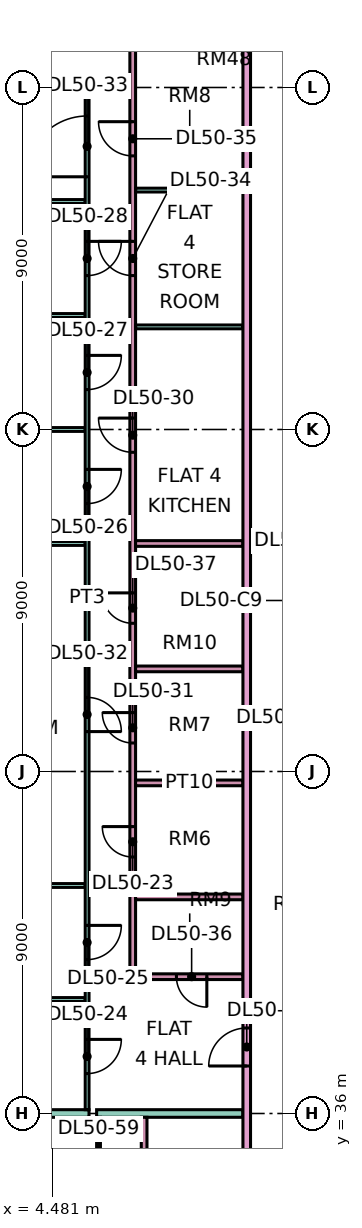
"""IFC4 building model, lengths in metres.
Left out: names, types, materials, properties, quantities, classifications, styles, units other than length and angle.
Written with IfcOpenShell. Run it as: python <this file> out.ifc"""

import sys

from ifc_helpers import new_model, si_unit, direction, frame, frame_2d, origin, place, context, subcontext, project, spatial, rectangle, extrude, element, fill, save


model = new_model("IFC4")
c1 = context("Model", 3, precision=1e-05, world=origin(), true_north=direction((0.0, 1.0)))
c2 = subcontext(c1, "Body", "Model", "MODEL_VIEW")
j1 = project(units=[si_unit("LENGTHUNIT", "METRE"), si_unit("PLANEANGLEUNIT", "RADIAN")], contexts=[c1])
p1 = place(None, origin())
s1 = spatial("IfcSite", under=j1, at=p1, CompositionType="ELEMENT")
p2 = place(p1, origin())
s2 = spatial("IfcBuilding", under=s1, at=p2, CompositionType="ELEMENT")
p3 = place(p2, frame((0.0, 0.0, 215.4)))
s3 = spatial("IfcBuildingStorey", under=s2, at=p3, CompositionType="ELEMENT", Elevation=215.4)
for number, where, z_axis, x_axis in (
    (1, (-1.351, 54.0, 0.0), (0.0, 0.0, 1.0), (1.0, 0.0, 0.0)),
    (2, (-1.351, 57.0, 0.0), (0.0, 0.0, 1.0), (1.0, 0.0, 0.0)),
    (3, (-1.351, 60.0, 0.0), (0.0, 0.0, 1.0), (1.0, 0.0, 0.0)),
):
    element("IfcWall", number, at=place(p3, frame(where, z_axis=z_axis, x_axis=x_axis)), inside=s3, PredefinedType="PARTITIONING", context=c2, shape_type="SweptSolid", body=[
        extrude(rectangle(XDim=6.701, YDim=0.1, at=frame_2d((3.351, 0.0))), origin(), (0.0, 0.0, 1.0), 3.35),
    ])
p4 = place(p3, frame((0.0, 36.0, 0.0), z_axis=(0.0, 0.0, 1.0), x_axis=(1.0, 0.0, 0.0)))
e4 = element("IfcWall", 4, at=p4, inside=s3, PredefinedType="PARTITIONING", context=c2, shape_type="SweptSolid", body=[
    extrude(rectangle(XDim=5.45, YDim=0.2, at=frame_2d((2.725, 0.0))), origin(), (0.0, 0.0, 1.0), 3.35),
])
p5 = place(p3, frame((-1.35, 51.0, 0.0), z_axis=(0.0, 0.0, 1.0), x_axis=(1.0, 0.0, 0.0)))
e5 = element("IfcWall", 5, at=p5, inside=s3, PredefinedType="PARTITIONING", context=c2, shape_type="SweptSolid", body=[
    extrude(rectangle(XDim=6.7, YDim=0.1, at=frame_2d((3.35, 0.0))), origin(), (0.0, 0.0, 1.0), 3.35),
])
for number, where, z_axis, x_axis in (
    (6, (0.074, 39.0, 0.0), (0.0, 0.0, 1.0), (1.0, 0.0, 0.0)),
    (7, (0.074, 42.0, 0.0), (0.0, 0.0, 1.0), (1.0, 0.0, 0.0)),
):
    element("IfcWall", number, at=place(p3, frame(where, z_axis=z_axis, x_axis=x_axis)), inside=s3, PredefinedType="PARTITIONING", context=c2, shape_type="SweptSolid", body=[
        extrude(rectangle(XDim=5.276, YDim=0.1, at=frame_2d((2.638, 0.0))), origin(), (0.0, 0.0, 1.0), 3.35),
    ])
p6 = place(p3, frame((5.4, 36.1, 0.0), z_axis=(0.0, 0.0, 1.0), x_axis=(0.0, 1.0, 0.0)))
e8 = element("IfcWall", 8, at=p6, inside=s3, PredefinedType="PARTITIONING", context=c2, shape_type="SweptSolid", body=[
    extrude(rectangle(XDim=26.95, YDim=0.1, at=frame_2d((13.475, 0.0))), origin(), (0.0, 0.0, 1.0), 3.35),
])
p7 = place(p6, frame((0.95, 0.0, 0.0)))
e9 = element("IfcOpeningElement", 9, at=p7, cuts=e8, PredefinedType="OPENING", context=c2, shape_type="SweptSolid", body=[
    extrude(rectangle(XDim=0.9, YDim=2.1, at=frame_2d((0.45, 1.05))), frame((0.0, 0.06, 0.0), z_axis=(0.0, -1.0, 0.0), x_axis=(1.0, 0.0, 0.0)), (0.0, 0.0, 1.0), 0.12),
])
p8 = place(p6, frame((3.95, 0.0, 0.0)))
e10 = element("IfcOpeningElement", 10, at=p8, cuts=e8, PredefinedType="OPENING", context=c2, shape_type="SweptSolid", body=[
    extrude(rectangle(XDim=0.9, YDim=2.1, at=frame_2d((0.45, 1.05))), frame((0.0, 0.06, 0.0), z_axis=(0.0, -1.0, 0.0), x_axis=(1.0, 0.0, 0.0)), (0.0, 0.0, 1.0), 0.12),
])
p9 = place(p6, frame((15.95, 0.0, 0.0)))
e11 = element("IfcOpeningElement", 11, at=p9, cuts=e8, PredefinedType="OPENING", context=c2, shape_type="SweptSolid", body=[
    extrude(rectangle(XDim=0.9, YDim=2.1, at=frame_2d((0.45, 1.05))), frame((0.0, 0.06, 0.0), z_axis=(0.0, -1.0, 0.0), x_axis=(1.0, 0.0, 0.0)), (0.0, 0.0, 1.0), 0.12),
])
p10 = place(p6, frame((18.95, 0.0, 0.0)))
e12 = element("IfcOpeningElement", 12, at=p10, cuts=e8, PredefinedType="OPENING", context=c2, shape_type="SweptSolid", body=[
    extrude(rectangle(XDim=0.9, YDim=2.1, at=frame_2d((0.45, 1.05))), frame((0.0, 0.06, 0.0), z_axis=(0.0, -1.0, 0.0), x_axis=(1.0, 0.0, 0.0)), (0.0, 0.0, 1.0), 0.12),
])
p11 = place(p6, frame((21.95, 0.0, 0.0)))
e13 = element("IfcOpeningElement", 13, at=p11, cuts=e8, PredefinedType="OPENING", context=c2, shape_type="SweptSolid", body=[
    extrude(rectangle(XDim=0.9, YDim=2.1, at=frame_2d((0.45, 1.05))), frame((0.0, 0.06, 0.0), z_axis=(0.0, -1.0, 0.0), x_axis=(1.0, 0.0, 0.0)), (0.0, 0.0, 1.0), 0.12),
])
p12 = place(p6, frame((9.95, 0.0, 0.0)))
e14 = element("IfcOpeningElement", 14, at=p12, cuts=e8, PredefinedType="OPENING", context=c2, shape_type="SweptSolid", body=[
    extrude(rectangle(XDim=0.9, YDim=2.1, at=frame_2d((0.45, 1.05))), frame((0.0, 0.06, 0.0), z_axis=(0.0, -1.0, 0.0), x_axis=(1.0, 0.0, 0.0)), (0.0, 0.0, 1.0), 0.12),
])
p13 = place(p6, frame((24.55, 0.0, 0.0)))
e15 = element("IfcOpeningElement", 15, at=p13, cuts=e8, PredefinedType="OPENING", context=c2, shape_type="SweptSolid", body=[
    extrude(rectangle(XDim=1.6, YDim=2.1, at=frame_2d((0.8, 1.05))), frame((0.0, 0.06, 0.0), z_axis=(0.0, -1.0, 0.0), x_axis=(1.0, 0.0, 0.0)), (0.0, 0.0, 1.0), 0.12),
])
p14 = place(p3, frame((5.45, 63.0, 0.0), z_axis=(0.0, 0.0, 1.0), x_axis=(1.0, 0.0, 0.0)))
e16 = element("IfcWall", 16, at=p14, inside=s3, PredefinedType="PARTITIONING", context=c2, shape_type="SweptSolid", body=[
    extrude(rectangle(XDim=0.55, YDim=0.1, at=frame_2d((0.275, 0.0))), origin(), (0.0, 0.0, 1.0), 3.35),
])
p15 = place(p3, frame((5.65, 36.0, 0.0), z_axis=(0.0, 0.0, 1.0), x_axis=(1.0, 0.0, 0.0)))
e17 = element("IfcWall", 17, at=p15, inside=s3, PredefinedType="PARTITIONING", context=c2, shape_type="SweptSolid", body=[
    extrude(rectangle(XDim=3.85, YDim=0.2, at=frame_2d((1.925, 0.0))), origin(), (0.0, 0.0, 1.0), 3.35),
])
p16 = place(p3, frame((5.7, 29.95, 0.0), z_axis=(0.0, 0.0, 1.0), x_axis=(0.0, 1.0, 0.0)))
e18 = element("IfcWall", 18, at=p16, inside=s3, PredefinedType="PARTITIONING", context=c2, shape_type="SweptSolid", body=[
    extrude(rectangle(XDim=5.95, YDim=0.1, at=frame_2d((2.975, 0.0))), origin(), (0.0, 0.0, 1.0), 3.35),
])
p17 = place(p16, frame((1.1, 0.0, 0.0)))
e19 = element("IfcOpeningElement", 19, at=p17, cuts=e18, PredefinedType="OPENING", context=c2, shape_type="SweptSolid", body=[
    extrude(rectangle(XDim=0.9, YDim=2.1, at=frame_2d((0.45, 1.05))), frame((0.0, 0.06, 0.0), z_axis=(0.0, -1.0, 0.0), x_axis=(1.0, 0.0, 0.0)), (0.0, 0.0, 1.0), 0.12),
])
p18 = place(p16, frame((4.1, 0.0, 0.0)))
e20 = element("IfcOpeningElement", 20, at=p18, cuts=e18, PredefinedType="OPENING", context=c2, shape_type="SweptSolid", body=[
    extrude(rectangle(XDim=0.9, YDim=2.1, at=frame_2d((0.45, 1.05))), frame((0.0, 0.06, 0.0), z_axis=(0.0, -1.0, 0.0), x_axis=(1.0, 0.0, 0.0)), (0.0, 0.0, 1.0), 0.12),
])
p19 = place(p3, frame((6.6, 39.525, 0.0), z_axis=(0.0, 0.0, 1.0), x_axis=(0.0, 1.0, 0.0)))
e21 = element("IfcWall", 21, at=p19, inside=s3, PredefinedType="PARTITIONING", context=c2, shape_type="SweptSolid", body=[
    extrude(rectangle(XDim=24.825, YDim=0.15, at=frame_2d((12.413, 0.0))), origin(), (0.0, 0.0, 1.0), 3.35),
])
p20 = place(p19, frame((3.225, 0.0, 0.0)))
e22 = element("IfcOpeningElement", 22, at=p20, cuts=e21, PredefinedType="OPENING", context=c2, shape_type="SweptSolid", body=[
    extrude(rectangle(XDim=0.8, YDim=2.1, at=frame_2d((0.4, 1.05))), frame((0.0, 0.085, 0.0), z_axis=(0.0, -1.0, 0.0), x_axis=(1.0, 0.0, 0.0)), (0.0, 0.0, 1.0), 0.17),
])
p21 = place(p19, frame((13.875, 0.0, 0.0)))
e23 = element("IfcOpeningElement", 23, at=p21, cuts=e21, PredefinedType="OPENING", context=c2, shape_type="SweptSolid", body=[
    extrude(rectangle(XDim=0.9, YDim=2.1, at=frame_2d((0.45, 1.05))), frame((0.0, 0.085, 0.0), z_axis=(0.0, -1.0, 0.0), x_axis=(1.0, 0.0, 0.0)), (0.0, 0.0, 1.0), 0.17),
])
p22 = place(p19, frame((6.225, 0.0, 0.0)))
e24 = element("IfcOpeningElement", 24, at=p22, cuts=e21, PredefinedType="OPENING", context=c2, shape_type="SweptSolid", body=[
    extrude(rectangle(XDim=0.8, YDim=2.1, at=frame_2d((0.4, 1.05))), frame((0.0, 0.085, 0.0), z_axis=(0.0, -1.0, 0.0), x_axis=(1.0, 0.0, 0.0)), (0.0, 0.0, 1.0), 0.17),
])
p23 = place(p19, frame((18.525, 0.0, 0.0)))
e25 = element("IfcOpeningElement", 25, at=p23, cuts=e21, PredefinedType="OPENING", context=c2, shape_type="SweptSolid", body=[
    extrude(rectangle(XDim=0.9, YDim=2.1, at=frame_2d((0.45, 1.05))), frame((0.0, 0.085, 0.0), z_axis=(0.0, -1.0, 0.0), x_axis=(1.0, 0.0, 0.0)), (0.0, 0.0, 1.0), 0.17),
])
p24 = place(p19, frame((21.675, 0.0, 0.0)))
e26 = element("IfcOpeningElement", 26, at=p24, cuts=e21, PredefinedType="OPENING", context=c2, shape_type="SweptSolid", body=[
    extrude(rectangle(XDim=0.9, YDim=2.1, at=frame_2d((0.45, 1.05))), frame((0.0, 0.085, 0.0), z_axis=(0.0, -1.0, 0.0), x_axis=(1.0, 0.0, 0.0)), (0.0, 0.0, 1.0), 0.17),
])
p25 = place(p19, frame((9.375, 0.0, 0.0)))
e27 = element("IfcOpeningElement", 27, at=p25, cuts=e21, PredefinedType="OPENING", context=c2, shape_type="SweptSolid", body=[
    extrude(rectangle(XDim=0.8, YDim=2.1, at=frame_2d((0.4, 1.05))), frame((0.0, 0.085, 0.0), z_axis=(0.0, -1.0, 0.0), x_axis=(1.0, 0.0, 0.0)), (0.0, 0.0, 1.0), 0.17),
])
p26 = place(p3, frame((6.675, 39.6, 0.0), z_axis=(0.0, 0.0, 1.0), x_axis=(1.0, 0.0, 0.0)))
e28 = element("IfcWall", 28, at=p26, inside=s3, PredefinedType="PARTITIONING", context=c2, shape_type="SweptSolid", body=[
    extrude(rectangle(XDim=2.825, YDim=0.15, at=frame_2d((1.413, 0.0))), origin(), (0.0, 0.0, 1.0), 3.35),
])
p27 = place(p26, frame((1.075, 0.0, 0.0)))
e29 = element("IfcOpeningElement", 29, at=p27, cuts=e28, PredefinedType="OPENING", context=c2, shape_type="SweptSolid", body=[
    extrude(rectangle(XDim=0.8, YDim=2.1, at=frame_2d((0.4, 1.05))), frame((0.0, 0.085, 0.0), z_axis=(0.0, -1.0, 0.0), x_axis=(1.0, 0.0, 0.0)), (0.0, 0.0, 1.0), 0.17),
])
for number, where, z_axis, x_axis in (
    (30, (6.675, 41.7, 0.0), (0.0, 0.0, 1.0), (1.0, 0.0, 0.0)),
    (31, (6.675, 44.7, 0.0), (0.0, 0.0, 1.0), (1.0, 0.0, 0.0)),
    (32, (6.675, 47.7, 0.0), (0.0, 0.0, 1.0), (1.0, 0.0, 0.0)),
    (33, (6.675, 51.0, 0.0), (0.0, 0.0, 1.0), (1.0, 0.0, 0.0)),
):
    element("IfcWall", number, at=place(p3, frame(where, z_axis=z_axis, x_axis=x_axis)), inside=s3, PredefinedType="PARTITIONING", context=c2, shape_type="SweptSolid", body=[
        extrude(rectangle(XDim=2.825, YDim=0.15, at=frame_2d((1.413, 0.0))), origin(), (0.0, 0.0, 1.0), 3.35),
    ])
for number, where, z_axis, x_axis in (
    (34, (6.675, 56.7, 0.0), (0.0, 0.0, 1.0), (1.0, 0.0, 0.0)),
    (35, (6.675, 60.3, 0.0), (0.0, 0.0, 1.0), (1.0, 0.0, 0.0)),
):
    element("IfcWall", number, at=place(p3, frame(where, z_axis=z_axis, x_axis=x_axis)), inside=s3, PredefinedType="PARTITIONING", context=c2, shape_type="SweptSolid", body=[
        extrude(rectangle(XDim=2.825, YDim=0.1, at=frame_2d((1.413, 0.0))), origin(), (0.0, 0.0, 1.0), 3.35),
    ])
p28 = place(p3, frame((6.9, 27.225, 0.0), z_axis=(0.0, 0.0, 1.0), x_axis=(0.0, 1.0, 0.0)))
e36 = element("IfcWall", 36, at=p28, inside=s3, PredefinedType="PARTITIONING", context=c2, shape_type="SweptSolid", body=[
    extrude(rectangle(XDim=8.675, YDim=0.15, at=frame_2d((4.337, 0.0))), origin(), (0.0, 0.0, 1.0), 3.35),
])
p29 = place(p28, frame((1.125, 0.0, 0.0)))
e37 = element("IfcOpeningElement", 37, at=p29, cuts=e36, PredefinedType="OPENING", context=c2, shape_type="SweptSolid", body=[
    extrude(rectangle(XDim=0.8, YDim=2.1, at=frame_2d((0.4, 1.05))), frame((0.0, 0.085, 0.0), z_axis=(0.0, -1.0, 0.0), x_axis=(1.0, 0.0, 0.0)), (0.0, 0.0, 1.0), 0.17),
])
p30 = place(p28, frame((5.475, 0.0, 0.0)))
e38 = element("IfcOpeningElement", 38, at=p30, cuts=e36, PredefinedType="OPENING", context=c2, shape_type="SweptSolid", body=[
    extrude(rectangle(XDim=0.9, YDim=2.1, at=frame_2d((0.45, 1.05))), frame((0.0, 0.085, 0.0), z_axis=(0.0, -1.0, 0.0), x_axis=(1.0, 0.0, 0.0)), (0.0, 0.0, 1.0), 0.17),
])
p31 = place(p3, frame((9.6, 20.0, 0.0), z_axis=(0.0, 0.0, 1.0), x_axis=(0.0, 1.0, 0.0)))
e39 = element("IfcWall", 39, at=p31, inside=s3, PredefinedType="PARTITIONING", context=c2, shape_type="SweptSolid", body=[
    extrude(rectangle(XDim=44.35, YDim=0.2, at=frame_2d((22.175, 0.0))), origin(), (0.0, 0.0, 1.0), 3.35),
])
p32 = place(p31, frame((17.25, 0.0, 0.0)))
e40 = element("IfcOpeningElement", 40, at=p32, cuts=e39, PredefinedType="OPENING", context=c2, shape_type="SweptSolid", body=[
    extrude(rectangle(XDim=1.0, YDim=2.1, at=frame_2d((0.5, 1.05))), frame((0.0, 0.11, 0.0), z_axis=(0.0, -1.0, 0.0), x_axis=(1.0, 0.0, 0.0)), (0.0, 0.0, 1.0), 0.22),
])
p33 = place(p31, frame((0.6, 0.0, 0.0)))
e41 = element("IfcOpeningElement", 41, at=p33, cuts=e39, PredefinedType="OPENING", context=c2, shape_type="SweptSolid", body=[
    extrude(rectangle(XDim=1.2, YDim=2.1, at=frame_2d((0.6, 1.05))), frame((0.0, 0.11, 0.0), z_axis=(0.0, -1.0, 0.0), x_axis=(1.0, 0.0, 0.0)), (0.0, 0.0, 1.0), 0.22),
])
p34 = place(p31, frame((4.35, 0.0, 0.0)))
e42 = element("IfcOpeningElement", 42, at=p34, cuts=e39, PredefinedType="OPENING", context=c2, shape_type="SweptSolid", body=[
    extrude(rectangle(XDim=1.0, YDim=2.1, at=frame_2d((0.5, 1.05))), frame((0.0, 0.11, 0.0), z_axis=(0.0, -1.0, 0.0), x_axis=(1.0, 0.0, 0.0)), (0.0, 0.0, 1.0), 0.22),
])
p35 = place(p20, frame((0.8, 0.0, 0.0), z_axis=(0.0, 0.0, 1.0), x_axis=(-1.0, 0.0, 0.0)))
e43 = element("IfcDoor", 43, at=p35, inside=s3, OperationType="SINGLE_SWING_RIGHT", PredefinedType="DOOR", context=c2, shape_type="SweptSolid", body=[
    extrude(rectangle(XDim=0.8, YDim=2.1, at=frame_2d((0.4, 1.05))), frame((0.0, 0.025, 0.0), z_axis=(0.0, -1.0, 0.0), x_axis=(1.0, 0.0, 0.0)), (0.0, 0.0, 1.0), 0.05),
])
fill(e22, e43)
p36 = place(p7, origin())
e44 = element("IfcDoor", 44, at=p36, inside=s3, OperationType="SINGLE_SWING_RIGHT", PredefinedType="DOOR", context=c2, shape_type="SweptSolid", body=[
    extrude(rectangle(XDim=0.9, YDim=2.1, at=frame_2d((0.45, 1.05))), frame((0.0, 0.025, 0.0), z_axis=(0.0, -1.0, 0.0), x_axis=(1.0, 0.0, 0.0)), (0.0, 0.0, 1.0), 0.05),
])
fill(e9, e44)
p37 = place(p8, origin())
e45 = element("IfcDoor", 45, at=p37, inside=s3, OperationType="SINGLE_SWING_RIGHT", PredefinedType="DOOR", context=c2, shape_type="SweptSolid", body=[
    extrude(rectangle(XDim=0.9, YDim=2.1, at=frame_2d((0.45, 1.05))), frame((0.0, 0.025, 0.0), z_axis=(0.0, -1.0, 0.0), x_axis=(1.0, 0.0, 0.0)), (0.0, 0.0, 1.0), 0.05),
])
fill(e10, e45)
p38 = place(p9, origin())
e46 = element("IfcDoor", 46, at=p38, inside=s3, OperationType="SINGLE_SWING_RIGHT", PredefinedType="DOOR", context=c2, shape_type="SweptSolid", body=[
    extrude(rectangle(XDim=0.9, YDim=2.1, at=frame_2d((0.45, 1.05))), frame((0.0, 0.025, 0.0), z_axis=(0.0, -1.0, 0.0), x_axis=(1.0, 0.0, 0.0)), (0.0, 0.0, 1.0), 0.05),
])
fill(e11, e46)
p39 = place(p10, origin())
e47 = element("IfcDoor", 47, at=p39, inside=s3, OperationType="SINGLE_SWING_RIGHT", PredefinedType="DOOR", context=c2, shape_type="SweptSolid", body=[
    extrude(rectangle(XDim=0.9, YDim=2.1, at=frame_2d((0.45, 1.05))), frame((0.0, 0.025, 0.0), z_axis=(0.0, -1.0, 0.0), x_axis=(1.0, 0.0, 0.0)), (0.0, 0.0, 1.0), 0.05),
])
fill(e12, e47)
p40 = place(p11, origin())
e48 = element("IfcDoor", 48, at=p40, inside=s3, OperationType="SINGLE_SWING_RIGHT", PredefinedType="DOOR", context=c2, shape_type="SweptSolid", body=[
    extrude(rectangle(XDim=0.9, YDim=2.1, at=frame_2d((0.45, 1.05))), frame((0.0, 0.025, 0.0), z_axis=(0.0, -1.0, 0.0), x_axis=(1.0, 0.0, 0.0)), (0.0, 0.0, 1.0), 0.05),
])
fill(e13, e48)
p41 = place(p32, origin())
e49 = element("IfcDoor", 49, at=p41, inside=s3, OperationType="SINGLE_SWING_LEFT", PredefinedType="DOOR", context=c2, shape_type="SweptSolid", body=[
    extrude(rectangle(XDim=1.0, YDim=2.1, at=frame_2d((0.5, 1.05))), frame((0.0, 0.025, 0.0), z_axis=(0.0, -1.0, 0.0), x_axis=(1.0, 0.0, 0.0)), (0.0, 0.0, 1.0), 0.05),
])
fill(e40, e49)
p42 = place(p21, frame((0.9, 0.0, 0.0), z_axis=(0.0, 0.0, 1.0), x_axis=(-1.0, 0.0, 0.0)))
e50 = element("IfcDoor", 50, at=p42, inside=s3, OperationType="SINGLE_SWING_RIGHT", PredefinedType="DOOR", context=c2, shape_type="SweptSolid", body=[
    extrude(rectangle(XDim=0.9, YDim=2.1, at=frame_2d((0.45, 1.05))), frame((0.0, 0.025, 0.0), z_axis=(0.0, -1.0, 0.0), x_axis=(1.0, 0.0, 0.0)), (0.0, 0.0, 1.0), 0.05),
])
fill(e23, e50)
p43 = place(p22, frame((0.8, 0.0, 0.0), z_axis=(0.0, 0.0, 1.0), x_axis=(-1.0, 0.0, 0.0)))
e51 = element("IfcDoor", 51, at=p43, inside=s3, OperationType="SINGLE_SWING_RIGHT", PredefinedType="DOOR", context=c2, shape_type="SweptSolid", body=[
    extrude(rectangle(XDim=0.8, YDim=2.1, at=frame_2d((0.4, 1.05))), frame((0.0, 0.025, 0.0), z_axis=(0.0, -1.0, 0.0), x_axis=(1.0, 0.0, 0.0)), (0.0, 0.0, 1.0), 0.05),
])
fill(e24, e51)
p44 = place(p12, frame((0.9, 0.0, 0.0), z_axis=(0.0, 0.0, 1.0), x_axis=(-1.0, 0.0, 0.0)))
e52 = element("IfcDoor", 52, at=p44, inside=s3, OperationType="SINGLE_SWING_LEFT", PredefinedType="DOOR", context=c2, shape_type="SweptSolid", body=[
    extrude(rectangle(XDim=0.9, YDim=2.1, at=frame_2d((0.45, 1.05))), frame((0.0, 0.025, 0.0), z_axis=(0.0, -1.0, 0.0), x_axis=(1.0, 0.0, 0.0)), (0.0, 0.0, 1.0), 0.05),
])
fill(e14, e52)
p45 = place(p13, origin())
e53 = element("IfcDoor", 53, at=p45, inside=s3, OperationType="DOUBLE_DOOR_SINGLE_SWING", PredefinedType="DOOR", context=c2, shape_type="SweptSolid", body=[
    extrude(rectangle(XDim=1.6, YDim=2.1, at=frame_2d((0.8, 1.05))), frame((0.0, 0.025, 0.0), z_axis=(0.0, -1.0, 0.0), x_axis=(1.0, 0.0, 0.0)), (0.0, 0.0, 1.0), 0.05),
])
fill(e15, e53)
p46 = place(p23, frame((0.9, 0.0, 0.0), z_axis=(0.0, 0.0, 1.0), x_axis=(-1.0, 0.0, 0.0)))
e54 = element("IfcDoor", 54, at=p46, inside=s3, OperationType="SINGLE_SWING_RIGHT", PredefinedType="DOOR", context=c2, shape_type="SweptSolid", body=[
    extrude(rectangle(XDim=0.9, YDim=2.1, at=frame_2d((0.45, 1.05))), frame((0.0, 0.025, 0.0), z_axis=(0.0, -1.0, 0.0), x_axis=(1.0, 0.0, 0.0)), (0.0, 0.0, 1.0), 0.05),
])
fill(e25, e54)
p47 = place(p24, frame((0.9, 0.0, 0.0), z_axis=(0.0, 0.0, 1.0), x_axis=(-1.0, 0.0, 0.0)))
e55 = element("IfcDoor", 55, at=p47, inside=s3, OperationType="SINGLE_SWING_RIGHT", PredefinedType="DOOR", context=c2, shape_type="SweptSolid", body=[
    extrude(rectangle(XDim=0.9, YDim=2.1, at=frame_2d((0.45, 1.05))), frame((0.0, 0.025, 0.0), z_axis=(0.0, -1.0, 0.0), x_axis=(1.0, 0.0, 0.0)), (0.0, 0.0, 1.0), 0.05),
])
fill(e26, e55)
p48 = place(p27, origin())
e56 = element("IfcDoor", 56, at=p48, inside=s3, OperationType="SINGLE_SWING_RIGHT", PredefinedType="DOOR", context=c2, shape_type="SweptSolid", body=[
    extrude(rectangle(XDim=0.8, YDim=2.1, at=frame_2d((0.4, 1.05))), frame((0.0, 0.025, 0.0), z_axis=(0.0, -1.0, 0.0), x_axis=(1.0, 0.0, 0.0)), (0.0, 0.0, 1.0), 0.05),
])
fill(e29, e56)
p49 = place(p25, frame((0.8, 0.0, 0.0), z_axis=(0.0, 0.0, 1.0), x_axis=(-1.0, 0.0, 0.0)))
e57 = element("IfcDoor", 57, at=p49, inside=s3, OperationType="SINGLE_SWING_RIGHT", PredefinedType="DOOR", context=c2, shape_type="SweptSolid", body=[
    extrude(rectangle(XDim=0.8, YDim=2.1, at=frame_2d((0.4, 1.05))), frame((0.0, 0.025, 0.0), z_axis=(0.0, -1.0, 0.0), x_axis=(1.0, 0.0, 0.0)), (0.0, 0.0, 1.0), 0.05),
])
fill(e27, e57)
save(model, sys.argv[1])
